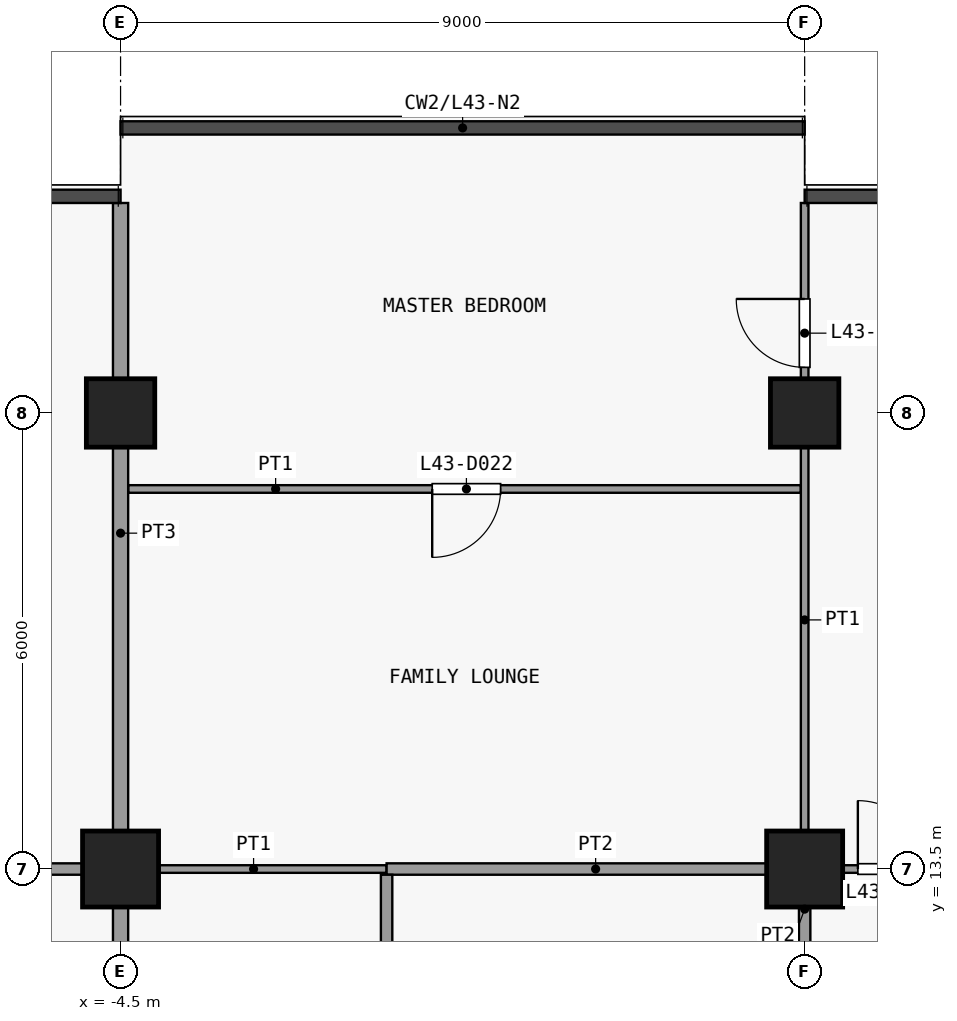
"""IFC4 building model, lengths in metres.
Left out: names, types, materials, properties, quantities, classifications, styles, units other than length and angle.
Written with IfcOpenShell. Run it as: python <this file> out.ifc"""

import sys

from ifc_helpers import new_model, si_unit, direction, frame, frame_2d, origin, origin_2d, place, context, subcontext, project, spatial, rectangle, extrude, element, fill, save


model = new_model("IFC4")
c1 = context("Model", 3, precision=1e-05, world=origin(), true_north=direction((0.0, 1.0)))
c2 = subcontext(c1, "Body", "Model", "MODEL_VIEW")
j1 = project(units=[si_unit("LENGTHUNIT", "METRE"), si_unit("PLANEANGLEUNIT", "RADIAN")], contexts=[c1])
p1 = place(None, origin())
s1 = spatial("IfcSite", under=j1, at=p1, CompositionType="ELEMENT")
p2 = place(p1, origin())
s2 = spatial("IfcBuilding", under=s1, at=p2, CompositionType="ELEMENT")
p3 = place(p2, frame((0.0, 0.0, 174.5)))
s3 = spatial("IfcBuildingStorey", under=s2, at=p3, CompositionType="ELEMENT", Elevation=174.5)
p4 = place(p3, frame((-4.5, 13.5, 0.0), z_axis=(0.0, 0.0, 1.0), x_axis=(1.0, 0.0, 0.0)))
e1 = element("IfcColumn", 1, at=p4, inside=s3, PredefinedType="COLUMN", context=c2, shape_type="SweptSolid", body=[
    extrude(rectangle(XDim=1.0, YDim=1.0, at=origin_2d()), origin(), (0.0, 0.0, 1.0), 3.6),
])
p5 = place(p3, frame((-4.5, 19.5, 0.0), z_axis=(0.0, 0.0, 1.0), x_axis=(1.0, 0.0, 0.0)))
e2 = element("IfcColumn", 2, at=p5, inside=s3, PredefinedType="COLUMN", context=c2, shape_type="SweptSolid", body=[
    extrude(rectangle(XDim=0.9, YDim=0.9, at=origin_2d()), origin(), (0.0, 0.0, 1.0), 3.6),
])
p6 = place(p3, frame((4.5, 13.5, 0.0), z_axis=(0.0, 0.0, 1.0), x_axis=(1.0, 0.0, 0.0)))
e3 = element("IfcColumn", 3, at=p6, inside=s3, PredefinedType="COLUMN", context=c2, shape_type="SweptSolid", body=[
    extrude(rectangle(XDim=1.0, YDim=1.0, at=origin_2d()), origin(), (0.0, 0.0, 1.0), 3.6),
])
p7 = place(p3, frame((4.5, 19.5, 0.0), z_axis=(0.0, 0.0, 1.0), x_axis=(1.0, 0.0, 0.0)))
e4 = element("IfcColumn", 4, at=p7, inside=s3, PredefinedType="COLUMN", context=c2, shape_type="SweptSolid", body=[
    extrude(rectangle(XDim=0.9, YDim=0.9, at=origin_2d()), origin(), (0.0, 0.0, 1.0), 3.6),
])
p8 = place(p3, frame((-4.5, 13.5, 0.0), z_axis=(0.0, 0.0, 1.0), x_axis=(1.0, 0.0, 0.0)))
e5 = element("IfcWall", 5, at=p8, inside=s3, PredefinedType="PARTITIONING", context=c2, shape_type="SweptSolid", body=[
    extrude(rectangle(XDim=3.5, YDim=0.1, at=frame_2d((1.75, 0.0))), origin(), (0.0, 0.0, 1.0), 3.3),
])
p9 = place(p3, frame((4.5, 13.5, 0.0), z_axis=(0.0, 0.0, 1.0), x_axis=(1.0, 0.0, 0.0)))
e6 = element("IfcWall", 6, at=p9, inside=s3, PredefinedType="PARTITIONING", context=c2, shape_type="SweptSolid", body=[
    extrude(rectangle(XDim=2.4, YDim=0.1, at=frame_2d((1.2, 0.0))), origin(), (0.0, 0.0, 1.0), 3.3),
])
p10 = place(p9, frame((0.7, 0.0, 0.0)))
e7 = element("IfcOpeningElement", 7, at=p10, cuts=e6, PredefinedType="OPENING", context=c2, shape_type="SweptSolid", body=[
    extrude(rectangle(XDim=0.9, YDim=2.1, at=frame_2d((0.45, 1.05))), frame((0.0, 0.06, 0.0), z_axis=(0.0, -1.0, 0.0), x_axis=(1.0, 0.0, 0.0)), (0.0, 0.0, 1.0), 0.12),
])
p11 = place(p3, frame((-7.1, 13.5, 0.0), z_axis=(0.0, 0.0, 1.0), x_axis=(1.0, 0.0, 0.0)))
e8 = element("IfcWall", 8, at=p11, inside=s3, PredefinedType="PARTITIONING", context=c2, shape_type="SweptSolid", body=[
    extrude(rectangle(XDim=2.6, YDim=0.15, at=frame_2d((1.3, 0.0))), origin(), (0.0, 0.0, 1.0), 3.3),
])
p12 = place(p3, frame((-1.0, 13.5, 0.0), z_axis=(0.0, 0.0, 1.0), x_axis=(1.0, 0.0, 0.0)))
e9 = element("IfcWall", 9, at=p12, inside=s3, PredefinedType="PARTITIONING", context=c2, shape_type="SweptSolid", body=[
    extrude(rectangle(XDim=5.5, YDim=0.15, at=frame_2d((2.75, 0.0))), origin(), (0.0, 0.0, 1.0), 3.3),
])
p13 = place(p3, frame((-4.4, 18.5, 0.0), z_axis=(0.0, 0.0, 1.0), x_axis=(1.0, 0.0, 0.0)))
e10 = element("IfcWall", 10, at=p13, inside=s3, PredefinedType="PARTITIONING", context=c2, shape_type="SweptSolid", body=[
    extrude(rectangle(XDim=8.85, YDim=0.1, at=frame_2d((4.425, 0.0))), origin(), (0.0, 0.0, 1.0), 3.3),
])
p14 = place(p13, frame((4.0, 0.0, 0.0)))
e11 = element("IfcOpeningElement", 11, at=p14, cuts=e10, PredefinedType="OPENING", context=c2, shape_type="SweptSolid", body=[
    extrude(rectangle(XDim=0.9, YDim=2.1, at=frame_2d((0.45, 1.05))), frame((0.0, 0.06, 0.0), z_axis=(0.0, -1.0, 0.0), x_axis=(1.0, 0.0, 0.0)), (0.0, 0.0, 1.0), 0.12),
])
p15 = place(p3, frame((-4.5, 10.6, 0.0), z_axis=(0.0, 0.0, 1.0), x_axis=(0.0, 1.0, 0.0)))
e12 = element("IfcWall", 12, at=p15, inside=s3, PredefinedType="PARTITIONING", context=c2, shape_type="SweptSolid", body=[
    extrude(rectangle(XDim=2.825, YDim=0.2, at=frame_2d((1.413, 0.0))), origin(), (0.0, 0.0, 1.0), 3.3),
])
p16 = place(p3, frame((-4.5, 13.575, 0.0), z_axis=(0.0, 0.0, 1.0), x_axis=(0.0, 1.0, 0.0)))
e13 = element("IfcWall", 13, at=p16, inside=s3, PredefinedType="PARTITIONING", context=c2, shape_type="SweptSolid", body=[
    extrude(rectangle(XDim=8.688, YDim=0.2, at=frame_2d((4.344, 0.0))), origin(), (0.0, 0.0, 1.0), 3.3),
])
p17 = place(p3, frame((-1.0, 10.6, 0.0), z_axis=(0.0, 0.0, 1.0), x_axis=(0.0, 1.0, 0.0)))
e14 = element("IfcWall", 14, at=p17, inside=s3, PredefinedType="PARTITIONING", context=c2, shape_type="SweptSolid", body=[
    extrude(rectangle(XDim=2.825, YDim=0.15, at=frame_2d((1.413, 0.0))), origin(), (0.0, 0.0, 1.0), 3.3),
])
p18 = place(p17, frame((1.0, 0.0, 0.0)))
e15 = element("IfcOpeningElement", 15, at=p18, cuts=e14, PredefinedType="OPENING", context=c2, shape_type="SweptSolid", body=[
    extrude(rectangle(XDim=0.9, YDim=2.1, at=frame_2d((0.45, 1.05))), frame((0.0, 0.085, 0.0), z_axis=(0.0, -1.0, 0.0), x_axis=(1.0, 0.0, 0.0)), (0.0, 0.0, 1.0), 0.17),
])
p19 = place(p3, frame((4.5, 13.575, 0.0), z_axis=(0.0, 0.0, 1.0), x_axis=(0.0, 1.0, 0.0)))
e16 = element("IfcWall", 16, at=p19, inside=s3, PredefinedType="PARTITIONING", context=c2, shape_type="SweptSolid", body=[
    extrude(rectangle(XDim=8.688, YDim=0.1, at=frame_2d((4.344, 0.0))), origin(), (0.0, 0.0, 1.0), 3.3),
])
p20 = place(p19, frame((6.525, 0.0, 0.0)))
e17 = element("IfcOpeningElement", 17, at=p20, cuts=e16, PredefinedType="OPENING", context=c2, shape_type="SweptSolid", body=[
    extrude(rectangle(XDim=0.9, YDim=2.1, at=frame_2d((0.45, 1.05))), frame((0.0, 0.06, 0.0), z_axis=(0.0, -1.0, 0.0), x_axis=(1.0, 0.0, 0.0)), (0.0, 0.0, 1.0), 0.12),
])
p21 = place(p3, frame((4.5, 10.6, 0.0), z_axis=(0.0, 0.0, 1.0), x_axis=(0.0, 1.0, 0.0)))
e18 = element("IfcWall", 18, at=p21, inside=s3, PredefinedType="PARTITIONING", context=c2, shape_type="SweptSolid", body=[
    extrude(rectangle(XDim=2.825, YDim=0.15, at=frame_2d((1.413, 0.0))), origin(), (0.0, 0.0, 1.0), 3.3),
])
p22 = place(p21, frame((0.9, 0.0, 0.0)))
e19 = element("IfcOpeningElement", 19, at=p22, cuts=e18, PredefinedType="OPENING", context=c2, shape_type="SweptSolid", body=[
    extrude(rectangle(XDim=0.9, YDim=2.1, at=frame_2d((0.45, 1.05))), frame((0.0, 0.085, 0.0), z_axis=(0.0, -1.0, 0.0), x_axis=(1.0, 0.0, 0.0)), (0.0, 0.0, 1.0), 0.17),
])
p23 = place(p10, origin())
e20 = element("IfcDoor", 20, at=p23, inside=s3, OperationType="SINGLE_SWING_RIGHT", PredefinedType="DOOR", context=c2, shape_type="SweptSolid", body=[
    extrude(rectangle(XDim=0.9, YDim=2.1, at=frame_2d((0.45, 1.05))), frame((0.0, 0.025, 0.0), z_axis=(0.0, -1.0, 0.0), x_axis=(1.0, 0.0, 0.0)), (0.0, 0.0, 1.0), 0.05),
])
fill(e7, e20)
p24 = place(p14, origin())
e21 = element("IfcDoor", 21, at=p24, inside=s3, OperationType="SINGLE_SWING_LEFT", PredefinedType="DOOR", context=c2, shape_type="SweptSolid", body=[
    extrude(rectangle(XDim=0.9, YDim=2.1, at=frame_2d((0.45, 1.05))), frame((0.0, 0.025, 0.0), z_axis=(0.0, -1.0, 0.0), x_axis=(1.0, 0.0, 0.0)), (0.0, 0.0, 1.0), 0.05),
])
fill(e11, e21)
p25 = place(p20, origin())
e22 = element("IfcDoor", 22, at=p25, inside=s3, OperationType="SINGLE_SWING_LEFT", PredefinedType="DOOR", context=c2, shape_type="SweptSolid", body=[
    extrude(rectangle(XDim=0.9, YDim=2.1, at=frame_2d((0.45, 1.05))), frame((0.0, 0.025, 0.0), z_axis=(0.0, -1.0, 0.0), x_axis=(1.0, 0.0, 0.0)), (0.0, 0.0, 1.0), 0.05),
])
fill(e17, e22)
save(model, sys.argv[1])
